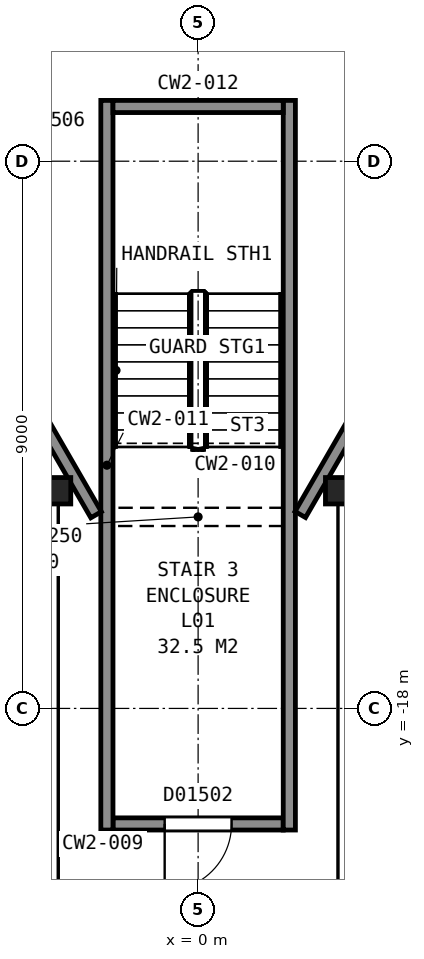
"""IFC4 building model, lengths in metres.
Left out: names, types, materials, properties, quantities, classifications, styles, units other than length and angle.
Written with IfcOpenShell. Run it as: python <this file> out.ifc"""

import sys

from ifc_helpers import new_model, si_unit, direction, frame, frame_2d, origin, origin_2d, place, context, subcontext, project, spatial, rectangle, i_section, extrude, element, fill, save


model = new_model("IFC4")
c1 = context("Model", 3, precision=1e-05, world=origin(), true_north=direction((0.0, 1.0)))
c2 = subcontext(c1, "Body", "Model", "MODEL_VIEW")
j1 = project(units=[si_unit("LENGTHUNIT", "METRE"), si_unit("PLANEANGLEUNIT", "RADIAN")], contexts=[c1])
p1 = place(None, origin())
s1 = spatial("IfcSite", under=j1, at=p1, CompositionType="ELEMENT")
p2 = place(p1, origin())
s2 = spatial("IfcBuilding", under=s1, at=p2, CompositionType="ELEMENT")
p3 = place(p2, frame((0.0, 0.0, 12.0)))
s3 = spatial("IfcBuildingStorey", under=s2, at=p3, CompositionType="ELEMENT", Elevation=12.0)
for number, where, z_axis, x_axis in (
    (1, (-2.3, -14.42, 0.0), (0.0, 0.0, 1.0), (1.0, 0.0, 0.0)),
    (2, (2.3, -14.42, 0.0), (0.0, 0.0, 1.0), (1.0, 0.0, 0.0)),
):
    element("IfcColumn", number, at=place(p3, frame(where, z_axis=z_axis, x_axis=x_axis)), inside=s3, PredefinedType="COLUMN", context=c2, shape_type="SweptSolid", body=[
        extrude(i_section(OverallWidth=0.411, OverallDepth=0.434, WebThickness=0.036, FlangeThickness=0.057, FilletRadius=0.015, at=origin_2d()), origin(), (0.0, 0.0, 1.0), 5.4),
    ])
p4 = place(p3, frame((-1.4, -19.9, 0.0), z_axis=(0.0, 0.0, 1.0), x_axis=(1.0, 0.0, 0.0)))
e3 = element("IfcWall", 3, at=p4, inside=s3, PredefinedType="PARTITIONING", context=c2, shape_type="SweptSolid", body=[
    extrude(rectangle(XDim=2.8, YDim=0.2, at=frame_2d((1.4, 0.0))), origin(), (0.0, 0.0, 1.0), 5.15),
])
p5 = place(p4, frame((0.85, 0.0, 0.0)))
e4 = element("IfcOpeningElement", 4, at=p5, cuts=e3, PredefinedType="OPENING", context=c2, shape_type="SweptSolid", body=[
    extrude(rectangle(XDim=1.1, YDim=2.1, at=frame_2d((0.55, 1.05))), frame((0.0, 0.11, 0.0), z_axis=(0.0, -1.0, 0.0), x_axis=(1.0, 0.0, 0.0)), (0.0, 0.0, 1.0), 0.22),
])
for number, where, z_axis, x_axis in (
    (5, (1.5, -8.0, 0.0), (0.0, 0.0, 1.0), (0.0, -1.0, 0.0)),
    (6, (-1.5, -8.0, 0.0), (0.0, 0.0, 1.0), (0.0, -1.0, 0.0)),
):
    element("IfcWall", number, at=place(p3, frame(where, z_axis=z_axis, x_axis=x_axis)), inside=s3, PredefinedType="PARTITIONING", context=c2, shape_type="SweptSolid", body=[
        extrude(rectangle(XDim=12.0, YDim=0.2, at=frame_2d((6.0, 0.0))), origin(), (0.0, 0.0, 1.0), 5.15),
    ])
p6 = place(p3, frame((-1.4, -8.1, 0.0), z_axis=(0.0, 0.0, 1.0), x_axis=(1.0, 0.0, 0.0)))
e7 = element("IfcWall", 7, at=p6, inside=s3, PredefinedType="PARTITIONING", context=c2, shape_type="SweptSolid", body=[
    extrude(rectangle(XDim=2.8, YDim=0.2, at=frame_2d((1.4, 0.0))), origin(), (0.0, 0.0, 1.0), 5.15),
])
p7 = place(p3, frame((-4.914, -9.208, 0.0), z_axis=(0.0, 0.0, 1.0), x_axis=(0.499947703927, -0.866055594831, 0.0)))
e8 = element("IfcWall", 8, at=p7, inside=s3, PredefinedType="PARTITIONING", context=c2, shape_type="SweptSolid", body=[
    extrude(rectangle(XDim=6.474, YDim=0.2, at=frame_2d((3.237, 0.0))), origin(), (0.0, 0.0, 1.0), 5.15),
])
p8 = place(p3, frame((1.68, -14.811, 0.0), z_axis=(0.0, 0.0, 1.0), x_axis=(0.499994327219, 0.866028678941, 0.0)))
e9 = element("IfcWall", 9, at=p8, inside=s3, PredefinedType="PARTITIONING", context=c2, shape_type="SweptSolid", body=[
    extrude(rectangle(XDim=23.968, YDim=0.2, at=frame_2d((11.984, 0.0))), origin(), (0.0, 0.0, 1.0), 5.15),
])
p9 = place(p8, frame((13.44, 0.0, 0.0)))
e10 = element("IfcOpeningElement", 10, at=p9, cuts=e9, PredefinedType="OPENING", context=c2, shape_type="SweptSolid", body=[
    extrude(rectangle(XDim=1.8, YDim=2.1, at=frame_2d((0.9, 1.05))), frame((0.0, 0.11, 0.0), z_axis=(0.0, -1.0, 0.0), x_axis=(1.0, 0.0, 0.0)), (0.0, 0.0, 1.0), 0.22),
])
p10 = place(p5, origin())
e11 = element("IfcDoor", 11, at=p10, inside=s3, OperationType="SINGLE_SWING_LEFT", PredefinedType="DOOR", context=c2, shape_type="SweptSolid", body=[
    extrude(rectangle(XDim=1.1, YDim=2.1, at=frame_2d((0.55, 1.05))), frame((0.0, 0.025, 0.0), z_axis=(0.0, -1.0, 0.0), x_axis=(1.0, 0.0, 0.0)), (0.0, 0.0, 1.0), 0.05),
])
fill(e4, e11)
save(model, sys.argv[1])
